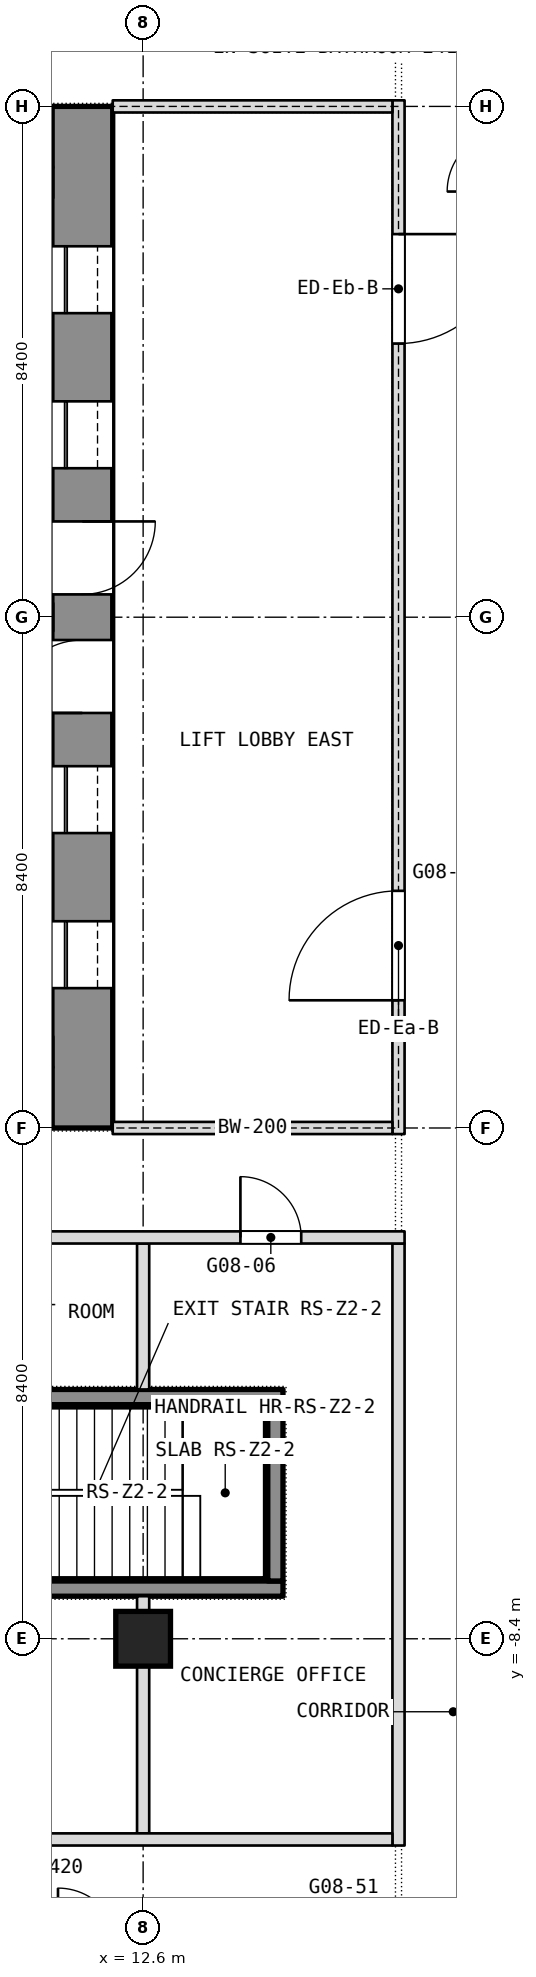
"""IFC4 building model, lengths in metres.
Left out: names, types, materials, properties, quantities, classifications, styles, units other than length and angle.
Written with IfcOpenShell. Run it as: python <this file> out.ifc"""

import sys

from ifc_helpers import new_model, si_unit, direction, frame, frame_2d, origin, origin_2d, place, context, subcontext, project, spatial, rectangle, extrude, element, fill, save


model = new_model("IFC4")
c1 = context("Model", 3, precision=1e-05, world=origin(), true_north=direction((0.0, 1.0)))
c2 = subcontext(c1, "Body", "Model", "MODEL_VIEW")
j1 = project(units=[si_unit("LENGTHUNIT", "METRE"), si_unit("PLANEANGLEUNIT", "RADIAN")], contexts=[c1])
p1 = place(None, origin())
s1 = spatial("IfcSite", under=j1, at=p1, CompositionType="ELEMENT")
p2 = place(p1, origin())
s2 = spatial("IfcBuilding", under=s1, at=p2, CompositionType="ELEMENT")
p3 = place(p2, frame((0.0, 0.0, 112.1)))
s3 = spatial("IfcBuildingStorey", under=s2, at=p3, CompositionType="ELEMENT", Elevation=112.1)
p4 = place(p3, frame((11.6, 0.0, 0.0), z_axis=(0.0, 0.0, 1.0), x_axis=(0.0, 1.0, 0.0)))
e1 = element("IfcWall", 1, at=p4, inside=s3, PredefinedType="SHEAR", context=c2, shape_type="SweptSolid", body=[
    extrude(rectangle(XDim=16.8, YDim=1.0, at=frame_2d((8.4, 0.0))), origin(), (0.0, 0.0, 1.0), 3.6),
])
p5 = place(p4, frame((2.3, 0.0, 0.0)))
e2 = element("IfcOpeningElement", 2, at=p5, cuts=e1, PredefinedType="OPENING", context=c2, shape_type="SweptSolid", body=[
    extrude(rectangle(XDim=1.1, YDim=2.1, at=frame_2d((0.55, 1.05))), frame((0.0, 0.5, 0.0), z_axis=(0.0, -1.0, 0.0), x_axis=(1.0, 0.0, 0.0)), (0.0, 0.0, 1.0), 1.0),
])
p6 = place(p4, frame((4.85, 0.0, 0.0)))
e3 = element("IfcOpeningElement", 3, at=p6, cuts=e1, PredefinedType="OPENING", context=c2, shape_type="SweptSolid", body=[
    extrude(rectangle(XDim=1.1, YDim=2.1, at=frame_2d((0.55, 1.05))), frame((0.0, 0.5, 0.0), z_axis=(0.0, -1.0, 0.0), x_axis=(1.0, 0.0, 0.0)), (0.0, 0.0, 1.0), 1.0),
])
p7 = place(p4, frame((6.825, 0.0, 0.0)))
e4 = element("IfcOpeningElement", 4, at=p7, cuts=e1, PredefinedType="OPENING", context=c2, shape_type="SweptSolid", body=[
    extrude(rectangle(XDim=1.2, YDim=2.1, at=frame_2d((0.6, 1.05))), frame((0.0, 0.5, 0.0), z_axis=(0.0, -1.0, 0.0), x_axis=(1.0, 0.0, 0.0)), (0.0, 0.0, 1.0), 1.0),
])
p8 = place(p4, frame((13.4, 0.0, 0.0)))
e5 = element("IfcOpeningElement", 5, at=p8, cuts=e1, PredefinedType="OPENING", context=c2, shape_type="SweptSolid", body=[
    extrude(rectangle(XDim=1.1, YDim=2.1, at=frame_2d((0.55, 1.05))), frame((0.0, 0.5, 0.0), z_axis=(0.0, -1.0, 0.0), x_axis=(1.0, 0.0, 0.0)), (0.0, 0.0, 1.0), 1.0),
])
p9 = place(p4, frame((10.85, 0.0, 0.0)))
e6 = element("IfcOpeningElement", 6, at=p9, cuts=e1, PredefinedType="OPENING", context=c2, shape_type="SweptSolid", body=[
    extrude(rectangle(XDim=1.1, YDim=2.1, at=frame_2d((0.55, 1.05))), frame((0.0, 0.5, 0.0), z_axis=(0.0, -1.0, 0.0), x_axis=(1.0, 0.0, 0.0)), (0.0, 0.0, 1.0), 1.0),
])
p10 = place(p4, frame((8.775, 0.0, 0.0)))
e7 = element("IfcOpeningElement", 7, at=p10, cuts=e1, PredefinedType="OPENING", context=c2, shape_type="SweptSolid", body=[
    extrude(rectangle(XDim=1.2, YDim=2.1, at=frame_2d((0.6, 1.05))), frame((0.0, 0.5, 0.0), z_axis=(0.0, -1.0, 0.0), x_axis=(1.0, 0.0, 0.0)), (0.0, 0.0, 1.0), 1.0),
])
p11 = place(p3, frame((12.6, -8.4, 0.0), z_axis=(0.0, 0.0, 1.0), x_axis=(1.0, 0.0, 0.0)))
e8 = element("IfcColumn", 8, at=p11, inside=s3, PredefinedType="COLUMN", context=c2, shape_type="SweptSolid", body=[
    extrude(rectangle(XDim=0.9, YDim=0.9, at=origin_2d()), origin(), (0.0, 0.0, 1.0), 3.6),
])
p12 = place(p3, frame((16.8, -11.8, 0.0), z_axis=(0.0, 0.0, 1.0), x_axis=(0.0, 1.0, 0.0)))
e9 = element("IfcWall", 9, at=p12, inside=s3, PredefinedType="PARTITIONING", context=c2, shape_type="SweptSolid", body=[
    extrude(rectangle(XDim=9.9, YDim=0.2, at=frame_2d((4.95, 0.0))), origin(), (0.0, 0.0, 1.0), 3.34),
])
p13 = place(p3, frame((12.6, -11.6, 0.0), z_axis=(0.0, 0.0, 1.0), x_axis=(0.0, 1.0, 0.0)))
e10 = element("IfcWall", 10, at=p13, inside=s3, PredefinedType="PARTITIONING", context=c2, shape_type="SweptSolid", body=[
    extrude(rectangle(XDim=3.9, YDim=0.2, at=frame_2d((1.95, 0.0))), origin(), (0.0, 0.0, 1.0), 3.34),
])
p14 = place(p3, frame((12.6, -4.3, 0.0), z_axis=(0.0, 0.0, 1.0), x_axis=(0.0, 1.0, 0.0)))
e11 = element("IfcWall", 11, at=p14, inside=s3, PredefinedType="PARTITIONING", context=c2, shape_type="SweptSolid", body=[
    extrude(rectangle(XDim=2.4, YDim=0.2, at=frame_2d((1.2, 0.0))), origin(), (0.0, 0.0, 1.0), 3.34),
])
p15 = place(p3, frame((-4.1, -11.7, 0.0), z_axis=(0.0, 0.0, 1.0), x_axis=(1.0, 0.0, 0.0)))
e12 = element("IfcWall", 12, at=p15, inside=s3, PredefinedType="PARTITIONING", context=c2, shape_type="SweptSolid", body=[
    extrude(rectangle(XDim=20.8, YDim=0.2, at=frame_2d((10.4, 0.0))), origin(), (0.0, 0.0, 1.0), 3.34),
])
p16 = place(p3, frame((8.6, -1.8, 0.0), z_axis=(0.0, 0.0, 1.0), x_axis=(1.0, 0.0, 0.0)))
e13 = element("IfcWall", 13, at=p16, inside=s3, PredefinedType="PARTITIONING", context=c2, shape_type="SweptSolid", body=[
    extrude(rectangle(XDim=8.3, YDim=0.2, at=frame_2d((4.15, 0.0))), origin(), (0.0, 0.0, 1.0), 3.34),
])
p17 = place(p16, frame((5.6, 0.0, 0.0)))
e14 = element("IfcOpeningElement", 14, at=p17, cuts=e13, PredefinedType="OPENING", context=c2, shape_type="SweptSolid", body=[
    extrude(rectangle(XDim=1.0, YDim=2.1, at=frame_2d((0.5, 1.05))), frame((0.0, 0.1, 0.0), z_axis=(0.0, -1.0, 0.0), x_axis=(1.0, 0.0, 0.0)), (0.0, 0.0, 1.0), 0.2),
])
p18 = place(p3, frame((16.8, -0.1, 0.0), z_axis=(0.0, 0.0, 1.0), x_axis=(0.0, 1.0, 0.0)))
e15 = element("IfcWall", 15, at=p18, inside=s3, PredefinedType="PARTITIONING", context=c2, shape_type="SweptSolid", body=[
    extrude(rectangle(XDim=17.0, YDim=0.2, at=frame_2d((8.5, 0.0))), origin(), (0.0, 0.0, 1.0), 3.34),
])
p19 = place(p18, frame((2.2, 0.0, 0.0)))
e16 = element("IfcOpeningElement", 16, at=p19, cuts=e15, PredefinedType="OPENING", context=c2, shape_type="SweptSolid", body=[
    extrude(rectangle(XDim=1.8, YDim=2.1, at=frame_2d((0.9, 1.05))), frame((0.0, 0.1, 0.0), z_axis=(0.0, -1.0, 0.0), x_axis=(1.0, 0.0, 0.0)), (0.0, 0.0, 1.0), 0.2),
])
p20 = place(p18, frame((13.0, 0.0, 0.0)))
e17 = element("IfcOpeningElement", 17, at=p20, cuts=e15, PredefinedType="OPENING", context=c2, shape_type="SweptSolid", body=[
    extrude(rectangle(XDim=1.8, YDim=2.1, at=frame_2d((0.9, 1.05))), frame((0.0, 0.1, 0.0), z_axis=(0.0, -1.0, 0.0), x_axis=(1.0, 0.0, 0.0)), (0.0, 0.0, 1.0), 0.2),
])
for number, where, z_axis, x_axis in (
    (18, (12.1, 0.0, 0.0), (0.0, 0.0, 1.0), (1.0, 0.0, 0.0)),
    (19, (12.1, 16.8, 0.0), (0.0, 0.0, 1.0), (1.0, 0.0, 0.0)),
):
    element("IfcWall", number, at=place(p3, frame(where, z_axis=z_axis, x_axis=x_axis)), inside=s3, PredefinedType="PARTITIONING", context=c2, shape_type="SweptSolid", body=[
        extrude(rectangle(XDim=4.6, YDim=0.2, at=frame_2d((2.3, 0.0))), origin(), (0.0, 0.0, 1.0), 2.89),
    ])
for number, where, z_axis, x_axis in (
    (20, (8.7, -7.575, 0.1), (0.0, 0.0, 1.0), (1.0, 0.0, 0.0)),
    (21, (8.7, -4.425, 0.1), (0.0, 0.0, 1.0), (1.0, 0.0, 0.0)),
):
    element("IfcWall", number, at=place(p3, frame(where, z_axis=z_axis, x_axis=x_axis)), inside=s3, PredefinedType="SHEAR", context=c2, shape_type="SweptSolid", body=[
        extrude(rectangle(XDim=6.2, YDim=0.25, at=frame_2d((3.1, 0.0))), origin(), (0.0, 0.0, 1.0), 3.6),
    ])
p21 = place(p3, frame((14.775, -7.45, 0.1), z_axis=(0.0, 0.0, 1.0), x_axis=(0.0, 1.0, 0.0)))
e22 = element("IfcWall", 22, at=p21, inside=s3, PredefinedType="SHEAR", context=c2, shape_type="SweptSolid", body=[
    extrude(rectangle(XDim=2.9, YDim=0.25, at=frame_2d((1.45, 0.0))), origin(), (0.0, 0.0, 1.0), 3.6),
])
p22 = place(p17, origin())
e23 = element("IfcDoor", 23, at=p22, inside=s3, OperationType="SINGLE_SWING_RIGHT", PredefinedType="DOOR", context=c2, shape_type="SweptSolid", body=[
    extrude(rectangle(XDim=1.0, YDim=2.1, at=frame_2d((0.5, 1.05))), frame((0.0, 0.025, 0.0), z_axis=(0.0, -1.0, 0.0), x_axis=(1.0, 0.0, 0.0)), (0.0, 0.0, 1.0), 0.05),
])
fill(e14, e23)
p23 = place(p5, origin())
e24 = element("IfcDoor", 24, at=p23, inside=s3, OperationType="SLIDING_TO_LEFT", PredefinedType="DOOR", context=c2, shape_type="SweptSolid", body=[
    extrude(rectangle(XDim=1.1, YDim=2.1, at=frame_2d((0.55, 1.05))), frame((0.0, 0.025, 0.0), z_axis=(0.0, -1.0, 0.0), x_axis=(1.0, 0.0, 0.0)), (0.0, 0.0, 1.0), 0.05),
])
fill(e2, e24)
p24 = place(p6, origin())
e25 = element("IfcDoor", 25, at=p24, inside=s3, OperationType="SLIDING_TO_LEFT", PredefinedType="DOOR", context=c2, shape_type="SweptSolid", body=[
    extrude(rectangle(XDim=1.1, YDim=2.1, at=frame_2d((0.55, 1.05))), frame((0.0, 0.025, 0.0), z_axis=(0.0, -1.0, 0.0), x_axis=(1.0, 0.0, 0.0)), (0.0, 0.0, 1.0), 0.05),
])
fill(e3, e25)
p25 = place(p7, origin())
e26 = element("IfcDoor", 26, at=p25, inside=s3, OperationType="SINGLE_SWING_LEFT", PredefinedType="DOOR", context=c2, shape_type="SweptSolid", body=[
    extrude(rectangle(XDim=1.2, YDim=2.1, at=frame_2d((0.6, 1.05))), frame((0.0, 0.025, 0.0), z_axis=(0.0, -1.0, 0.0), x_axis=(1.0, 0.0, 0.0)), (0.0, 0.0, 1.0), 0.05),
])
fill(e4, e26)
p26 = place(p8, origin())
e27 = element("IfcDoor", 27, at=p26, inside=s3, OperationType="SLIDING_TO_LEFT", PredefinedType="DOOR", context=c2, shape_type="SweptSolid", body=[
    extrude(rectangle(XDim=1.1, YDim=2.1, at=frame_2d((0.55, 1.05))), frame((0.0, 0.025, 0.0), z_axis=(0.0, -1.0, 0.0), x_axis=(1.0, 0.0, 0.0)), (0.0, 0.0, 1.0), 0.05),
])
fill(e5, e27)
p27 = place(p9, origin())
e28 = element("IfcDoor", 28, at=p27, inside=s3, OperationType="SLIDING_TO_LEFT", PredefinedType="DOOR", context=c2, shape_type="SweptSolid", body=[
    extrude(rectangle(XDim=1.1, YDim=2.1, at=frame_2d((0.55, 1.05))), frame((0.0, 0.025, 0.0), z_axis=(0.0, -1.0, 0.0), x_axis=(1.0, 0.0, 0.0)), (0.0, 0.0, 1.0), 0.05),
])
fill(e6, e28)
p28 = place(p10, origin())
e29 = element("IfcDoor", 29, at=p28, inside=s3, OperationType="SINGLE_SWING_LEFT", PredefinedType="DOOR", context=c2, shape_type="SweptSolid", body=[
    extrude(rectangle(XDim=1.2, YDim=2.1, at=frame_2d((0.6, 1.05))), frame((0.0, 0.025, 0.0), z_axis=(0.0, -1.0, 0.0), x_axis=(1.0, 0.0, 0.0)), (0.0, 0.0, 1.0), 0.05),
])
fill(e7, e29)
p29 = place(p19, origin())
e30 = element("IfcDoor", 30, at=p29, inside=s3, OperationType="DOUBLE_DOOR_SINGLE_SWING", PredefinedType="DOOR", context=c2, shape_type="SweptSolid", body=[
    extrude(rectangle(XDim=1.8, YDim=2.1, at=frame_2d((0.9, 1.05))), frame((0.0, 0.025, 0.0), z_axis=(0.0, -1.0, 0.0), x_axis=(1.0, 0.0, 0.0)), (0.0, 0.0, 1.0), 0.05),
])
fill(e16, e30)
p30 = place(p20, origin())
e31 = element("IfcDoor", 31, at=p30, inside=s3, OperationType="DOUBLE_DOOR_SINGLE_SWING", PredefinedType="DOOR", context=c2, shape_type="SweptSolid", body=[
    extrude(rectangle(XDim=1.8, YDim=2.1, at=frame_2d((0.9, 1.05))), frame((0.0, 0.025, 0.0), z_axis=(0.0, -1.0, 0.0), x_axis=(1.0, 0.0, 0.0)), (0.0, 0.0, 1.0), 0.05),
])
fill(e17, e31)
save(model, sys.argv[1])
